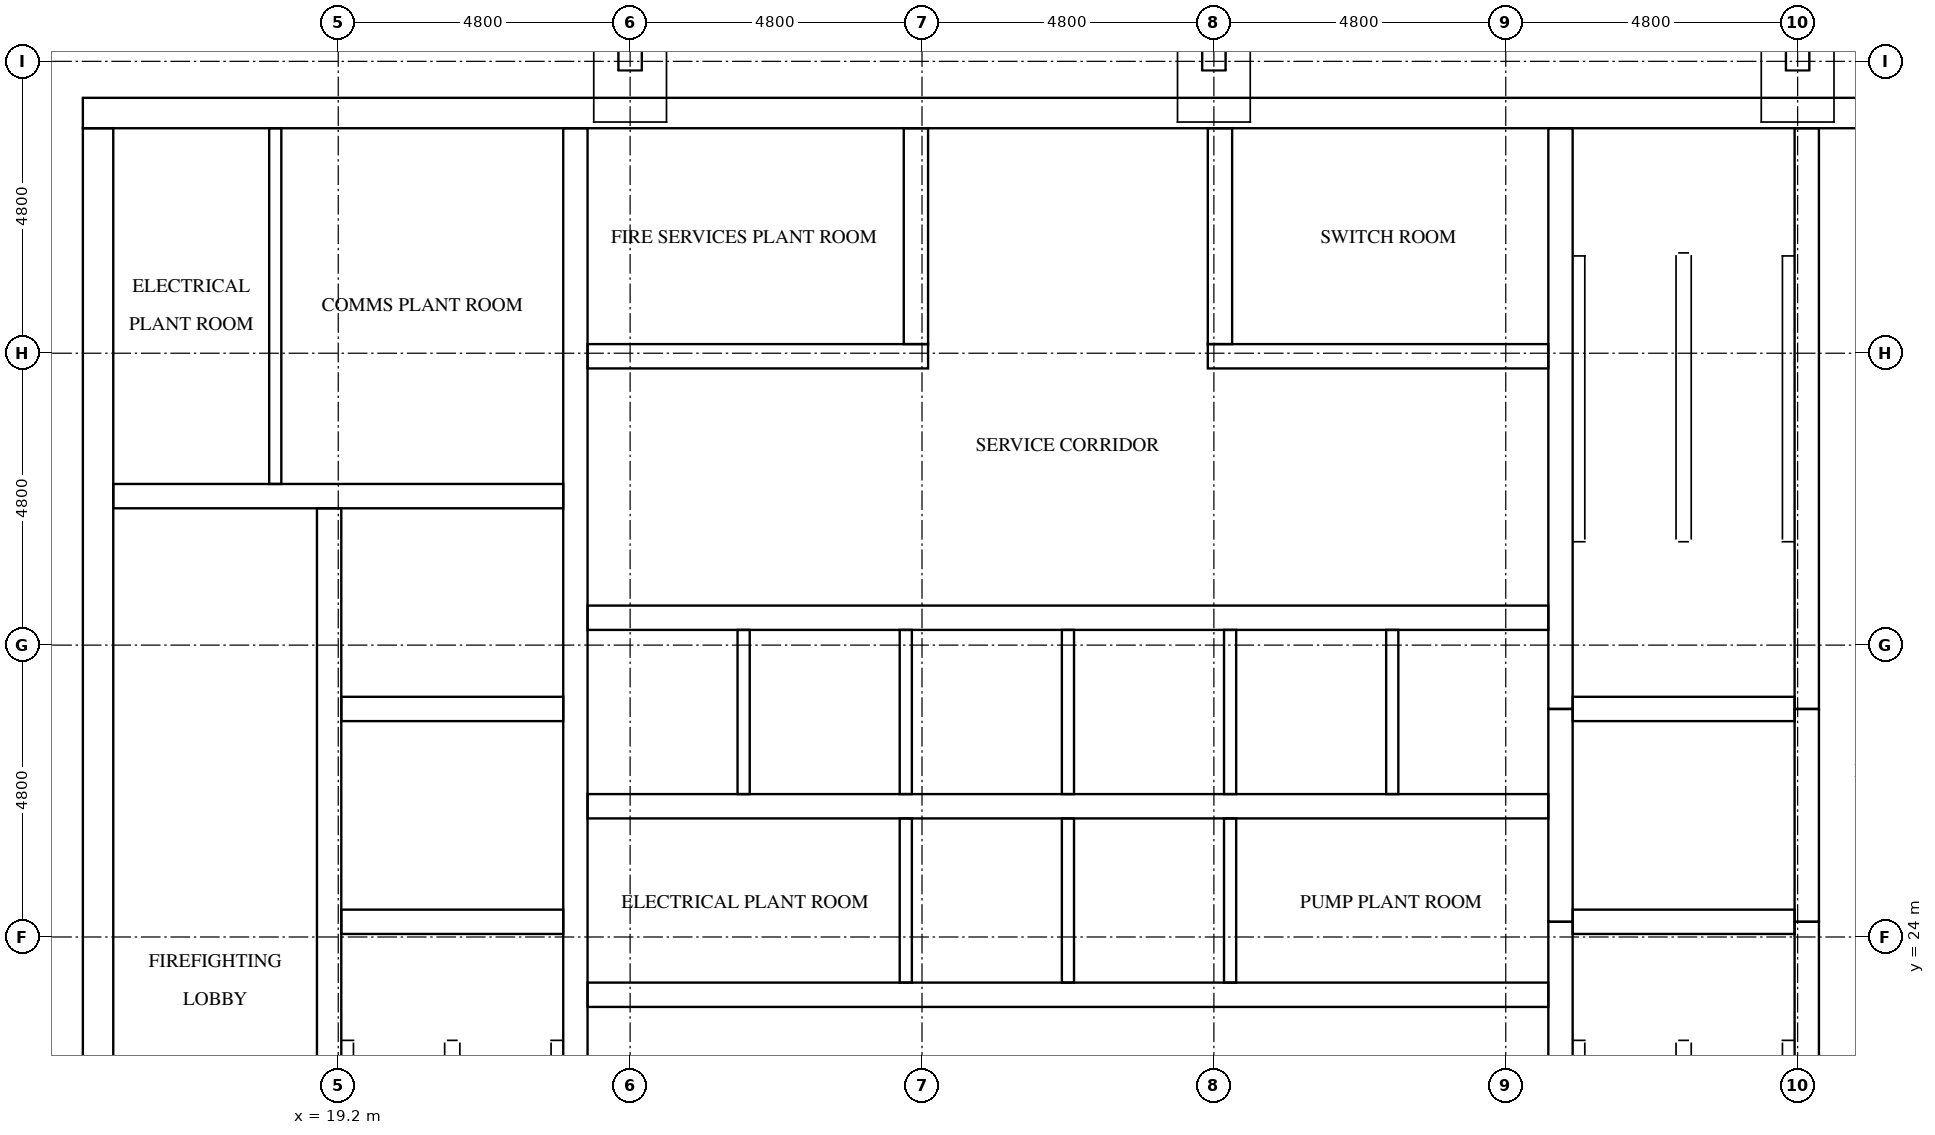
"""IFC4 building model, lengths in metres.
Left out: names, types, materials, properties, quantities, classifications, styles, units other than length and angle.
Written with IfcOpenShell. Run it as: python <this file> out.ifc"""

import sys

from ifc_helpers import new_model, si_unit, direction, frame, frame_2d, origin, place, context, subcontext, project, spatial, rectangle, extrude, element, fill, save


model = new_model("IFC4")
c1 = context("Model", 3, precision=1e-05, world=origin(), true_north=direction((0.0, 1.0)))
c2 = subcontext(c1, "Body", "Model", "MODEL_VIEW")
j1 = project(units=[si_unit("LENGTHUNIT", "METRE"), si_unit("PLANEANGLEUNIT", "RADIAN")], contexts=[c1])
p1 = place(None, origin())
s1 = spatial("IfcSite", under=j1, at=p1, CompositionType="ELEMENT")
p2 = place(p1, origin())
s2 = spatial("IfcBuilding", under=s1, at=p2, CompositionType="ELEMENT")
p3 = place(p2, frame((0.0, 0.0, 263.2)))
s3 = spatial("IfcBuildingStorey", under=s2, at=p3, CompositionType="ELEMENT", Elevation=263.2)
p4 = place(p3, frame((15.0, 37.55, 0.0), z_axis=(0.0, 0.0, 1.0), x_axis=(1.0, 0.0, 0.0)))
e1 = element("IfcWall", 1, at=p4, inside=s3, PredefinedType="SHEAR", context=c2, shape_type="SweptSolid", body=[
    extrude(rectangle(XDim=32.4, YDim=0.5, at=frame_2d((16.2, 0.0))), origin(), (0.0, 0.0, 1.0), 5.1),
])
p5 = place(p4, frame((15.3, 0.0, 0.0)))
e2 = element("IfcOpeningElement", 2, at=p5, cuts=e1, PredefinedType="OPENING", context=c2, shape_type="SweptSolid", body=[
    extrude(rectangle(XDim=1.8, YDim=2.1, at=frame_2d((0.9, 1.05))), frame((0.0, 0.26, 0.0), z_axis=(0.0, -1.0, 0.0), x_axis=(1.0, 0.0, 0.0)), (0.0, 0.0, 1.0), 0.52),
])
p6 = place(p4, frame((1.282, 0.0, 0.0)))
e3 = element("IfcOpeningElement", 3, at=p6, cuts=e1, PredefinedType="OPENING", context=c2, shape_type="SweptSolid", body=[
    extrude(rectangle(XDim=1.0, YDim=2.1, at=frame_2d((0.5, 1.05))), frame((0.0, 0.26, 0.0), z_axis=(0.0, -1.0, 0.0), x_axis=(1.0, 0.0, 0.0)), (0.0, 0.0, 1.0), 0.52),
])
p7 = place(p4, frame((5.082, 0.0, 0.0)))
e4 = element("IfcOpeningElement", 4, at=p7, cuts=e1, PredefinedType="OPENING", context=c2, shape_type="SweptSolid", body=[
    extrude(rectangle(XDim=1.0, YDim=2.1, at=frame_2d((0.5, 1.05))), frame((0.0, 0.26, 0.0), z_axis=(0.0, -1.0, 0.0), x_axis=(1.0, 0.0, 0.0)), (0.0, 0.0, 1.0), 0.52),
])
p8 = place(p3, frame((15.25, 15.5, 0.0), z_axis=(0.0, 0.0, 1.0), x_axis=(0.0, 1.0, 0.0)))
e5 = element("IfcWall", 5, at=p8, inside=s3, PredefinedType="SHEAR", context=c2, shape_type="SweptSolid", body=[
    extrude(rectangle(XDim=21.8, YDim=0.5, at=frame_2d((10.9, 0.0))), origin(), (0.0, 0.0, 1.0), 5.1),
])
p9 = place(p8, frame((5.26, 0.0, 0.0)))
e6 = element("IfcOpeningElement", 6, at=p9, cuts=e5, PredefinedType="OPENING", context=c2, shape_type="SweptSolid", body=[
    extrude(rectangle(XDim=1.2, YDim=2.1, at=frame_2d((0.6, 1.05))), frame((0.0, 0.26, 0.0), z_axis=(0.0, -1.0, 0.0), x_axis=(1.0, 0.0, 0.0)), (0.0, 0.0, 1.0), 0.52),
])
p10 = place(p3, frame((19.05, 15.5, 0.0), z_axis=(0.0, 0.0, 1.0), x_axis=(0.0, 1.0, 0.0)))
e7 = element("IfcWall", 7, at=p10, inside=s3, PredefinedType="SHEAR", context=c2, shape_type="SweptSolid", body=[
    extrude(rectangle(XDim=15.55, YDim=0.4, at=frame_2d((7.775, 0.0))), origin(), (0.0, 0.0, 1.0), 5.1),
])
p11 = place(p10, frame((9.95, 0.0, 0.0)))
e8 = element("IfcOpeningElement", 8, at=p11, cuts=e7, PredefinedType="OPENING", context=c2, shape_type="SweptSolid", body=[
    extrude(rectangle(XDim=1.1, YDim=2.1, at=frame_2d((0.55, 1.05))), frame((0.0, 0.21, 0.0), z_axis=(0.0, -1.0, 0.0), x_axis=(1.0, 0.0, 0.0)), (0.0, 0.0, 1.0), 0.42),
])
p12 = place(p10, frame((13.45, 0.0, 0.0)))
e9 = element("IfcOpeningElement", 9, at=p12, cuts=e7, PredefinedType="OPENING", context=c2, shape_type="SweptSolid", body=[
    extrude(rectangle(XDim=1.1, YDim=2.1, at=frame_2d((0.55, 1.05))), frame((0.0, 0.21, 0.0), z_axis=(0.0, -1.0, 0.0), x_axis=(1.0, 0.0, 0.0)), (0.0, 0.0, 1.0), 0.42),
])
p13 = place(p10, frame((0.7, 0.0, 0.0)))
e10 = element("IfcOpeningElement", 10, at=p13, cuts=e7, PredefinedType="OPENING", context=c2, shape_type="SweptSolid", body=[
    extrude(rectangle(XDim=1.2, YDim=2.1, at=frame_2d((0.6, 1.05))), frame((0.0, 0.21, 0.0), z_axis=(0.0, -1.0, 0.0), x_axis=(1.0, 0.0, 0.0)), (0.0, 0.0, 1.0), 0.42),
])
p14 = place(p3, frame((23.1, 15.5, 0.0), z_axis=(0.0, 0.0, 1.0), x_axis=(0.0, 1.0, 0.0)))
e11 = element("IfcWall", 11, at=p14, inside=s3, PredefinedType="SHEAR", context=c2, shape_type="SweptSolid", body=[
    extrude(rectangle(XDim=21.8, YDim=0.4, at=frame_2d((10.9, 0.0))), origin(), (0.0, 0.0, 1.0), 5.1),
])
p15 = place(p3, frame((39.3, 15.5, 0.0), z_axis=(0.0, 0.0, 1.0), x_axis=(0.0, 1.0, 0.0)))
e12 = element("IfcWall", 12, at=p15, inside=s3, PredefinedType="SHEAR", context=c2, shape_type="SweptSolid", body=[
    extrude(rectangle(XDim=8.75, YDim=0.4, at=frame_2d((4.375, 0.0))), origin(), (0.0, 0.0, 1.0), 5.1),
])
p16 = place(p3, frame((39.3, 24.25, 0.0), z_axis=(0.0, 0.0, 1.0), x_axis=(0.0, 1.0, 0.0)))
e13 = element("IfcWall", 13, at=p16, inside=s3, PredefinedType="SHEAR", context=c2, shape_type="SweptSolid", body=[
    extrude(rectangle(XDim=3.5, YDim=0.4, at=frame_2d((1.75, 0.0))), origin(), (0.0, 0.0, 1.0), 5.1),
])
p17 = place(p3, frame((39.3, 27.75, 0.0), z_axis=(0.0, 0.0, 1.0), x_axis=(0.0, 1.0, 0.0)))
e14 = element("IfcWall", 14, at=p17, inside=s3, PredefinedType="SHEAR", context=c2, shape_type="SweptSolid", body=[
    extrude(rectangle(XDim=9.55, YDim=0.4, at=frame_2d((4.775, 0.0))), origin(), (0.0, 0.0, 1.0), 5.1),
])
p18 = place(p3, frame((43.35, 15.5, 0.0), z_axis=(0.0, 0.0, 1.0), x_axis=(0.0, 1.0, 0.0)))
e15 = element("IfcWall", 15, at=p18, inside=s3, PredefinedType="SHEAR", context=c2, shape_type="SweptSolid", body=[
    extrude(rectangle(XDim=8.75, YDim=0.4, at=frame_2d((4.375, 0.0))), origin(), (0.0, 0.0, 1.0), 5.1),
])
p19 = place(p18, frame((0.7, 0.0, 0.0)))
e16 = element("IfcOpeningElement", 16, at=p19, cuts=e15, PredefinedType="OPENING", context=c2, shape_type="SweptSolid", body=[
    extrude(rectangle(XDim=1.2, YDim=2.1, at=frame_2d((0.6, 1.05))), frame((0.0, 0.21, 0.0), z_axis=(0.0, -1.0, 0.0), x_axis=(1.0, 0.0, 0.0)), (0.0, 0.0, 1.0), 0.42),
])
p20 = place(p3, frame((43.35, 24.25, 0.0), z_axis=(0.0, 0.0, 1.0), x_axis=(0.0, 1.0, 0.0)))
e17 = element("IfcWall", 17, at=p20, inside=s3, PredefinedType="SHEAR", context=c2, shape_type="SweptSolid", body=[
    extrude(rectangle(XDim=3.5, YDim=0.4, at=frame_2d((1.75, 0.0))), origin(), (0.0, 0.0, 1.0), 5.1),
])
p21 = place(p20, frame((1.2, 0.0, 0.0)))
e18 = element("IfcOpeningElement", 18, at=p21, cuts=e17, PredefinedType="OPENING", context=c2, shape_type="SweptSolid", body=[
    extrude(rectangle(XDim=1.1, YDim=2.1, at=frame_2d((0.55, 1.05))), frame((0.0, 0.21, 0.0), z_axis=(0.0, -1.0, 0.0), x_axis=(1.0, 0.0, 0.0)), (0.0, 0.0, 1.0), 0.42),
])
p22 = place(p3, frame((43.35, 27.75, 0.0), z_axis=(0.0, 0.0, 1.0), x_axis=(0.0, 1.0, 0.0)))
e19 = element("IfcWall", 19, at=p22, inside=s3, PredefinedType="SHEAR", context=c2, shape_type="SweptSolid", body=[
    extrude(rectangle(XDim=9.55, YDim=0.4, at=frame_2d((4.775, 0.0))), origin(), (0.0, 0.0, 1.0), 5.1),
])
p23 = place(p22, frame((7.65, 0.0, 0.0)))
e20 = element("IfcOpeningElement", 20, at=p23, cuts=e19, PredefinedType="OPENING", context=c2, shape_type="SweptSolid", body=[
    extrude(rectangle(XDim=1.2, YDim=2.1, at=frame_2d((0.6, 1.05))), frame((0.0, 0.21, 0.0), z_axis=(0.0, -1.0, 0.0), x_axis=(1.0, 0.0, 0.0)), (0.0, 0.0, 1.0), 0.42),
])
for number, where, z_axis, x_axis in (
    (21, (19.25, 24.25, 0.0), (0.0, 0.0, 1.0), (1.0, 0.0, 0.0)),
    (22, (19.25, 27.75, 0.0), (0.0, 0.0, 1.0), (1.0, 0.0, 0.0)),
):
    element("IfcWall", number, at=place(p3, frame(where, z_axis=z_axis, x_axis=x_axis)), inside=s3, PredefinedType="SHEAR", context=c2, shape_type="SweptSolid", body=[
        extrude(rectangle(XDim=3.65, YDim=0.4, at=frame_2d((1.825, 0.0))), origin(), (0.0, 0.0, 1.0), 5.1),
    ])
p24 = place(p3, frame((15.5, 31.25, 0.0), z_axis=(0.0, 0.0, 1.0), x_axis=(1.0, 0.0, 0.0)))
e23 = element("IfcWall", 23, at=p24, inside=s3, PredefinedType="SHEAR", context=c2, shape_type="SweptSolid", body=[
    extrude(rectangle(XDim=7.4, YDim=0.4, at=frame_2d((3.7, 0.0))), origin(), (0.0, 0.0, 1.0), 5.1),
])
for number, where, z_axis, x_axis in (
    (24, (39.5, 24.25, 0.0), (0.0, 0.0, 1.0), (1.0, 0.0, 0.0)),
    (25, (39.5, 27.75, 0.0), (0.0, 0.0, 1.0), (1.0, 0.0, 0.0)),
):
    element("IfcWall", number, at=place(p3, frame(where, z_axis=z_axis, x_axis=x_axis)), inside=s3, PredefinedType="SHEAR", context=c2, shape_type="SweptSolid", body=[
        extrude(rectangle(XDim=3.65, YDim=0.4, at=frame_2d((1.825, 0.0))), origin(), (0.0, 0.0, 1.0), 5.1),
    ])
p25 = place(p3, frame((23.3, 23.05, 0.0), z_axis=(0.0, 0.0, 1.0), x_axis=(1.0, 0.0, 0.0)))
e26 = element("IfcWall", 26, at=p25, inside=s3, PredefinedType="SHEAR", context=c2, shape_type="SweptSolid", body=[
    extrude(rectangle(XDim=15.8, YDim=0.4, at=frame_2d((7.9, 0.0))), origin(), (0.0, 0.0, 1.0), 5.1),
])
p26 = place(p25, frame((2.067, 0.0, 0.0)))
e27 = element("IfcOpeningElement", 27, at=p26, cuts=e26, PredefinedType="OPENING", context=c2, shape_type="SweptSolid", body=[
    extrude(rectangle(XDim=1.0, YDim=2.1, at=frame_2d((0.5, 1.05))), frame((0.0, 0.21, 0.0), z_axis=(0.0, -1.0, 0.0), x_axis=(1.0, 0.0, 0.0)), (0.0, 0.0, 1.0), 0.42),
])
p27 = place(p25, frame((12.733, 0.0, 0.0)))
e28 = element("IfcOpeningElement", 28, at=p27, cuts=e26, PredefinedType="OPENING", context=c2, shape_type="SweptSolid", body=[
    extrude(rectangle(XDim=1.0, YDim=2.1, at=frame_2d((0.5, 1.05))), frame((0.0, 0.21, 0.0), z_axis=(0.0, -1.0, 0.0), x_axis=(1.0, 0.0, 0.0)), (0.0, 0.0, 1.0), 0.42),
])
for number, where, z_axis, x_axis in (
    (29, (23.3, 26.15, 0.0), (0.0, 0.0, 1.0), (1.0, 0.0, 0.0)),
    (30, (23.3, 29.25, 0.0), (0.0, 0.0, 1.0), (1.0, 0.0, 0.0)),
):
    element("IfcWall", number, at=place(p3, frame(where, z_axis=z_axis, x_axis=x_axis)), inside=s3, PredefinedType="SHEAR", context=c2, shape_type="SweptSolid", body=[
        extrude(rectangle(XDim=15.8, YDim=0.4, at=frame_2d((7.9, 0.0))), origin(), (0.0, 0.0, 1.0), 5.1),
    ])
p28 = place(p3, frame((23.3, 33.55, 0.0), z_axis=(0.0, 0.0, 1.0), x_axis=(1.0, 0.0, 0.0)))
e31 = element("IfcWall", 31, at=p28, inside=s3, PredefinedType="SHEAR", context=c2, shape_type="SweptSolid", body=[
    extrude(rectangle(XDim=5.6, YDim=0.4, at=frame_2d((2.8, 0.0))), origin(), (0.0, 0.0, 1.0), 5.1),
])
p29 = place(p28, frame((2.1, 0.0, 0.0)))
e32 = element("IfcOpeningElement", 32, at=p29, cuts=e31, PredefinedType="OPENING", context=c2, shape_type="SweptSolid", body=[
    extrude(rectangle(XDim=1.0, YDim=2.1, at=frame_2d((0.5, 1.05))), frame((0.0, 0.21, 0.0), z_axis=(0.0, -1.0, 0.0), x_axis=(1.0, 0.0, 0.0)), (0.0, 0.0, 1.0), 0.42),
])
p30 = place(p3, frame((33.5, 33.55, 0.0), z_axis=(0.0, 0.0, 1.0), x_axis=(1.0, 0.0, 0.0)))
e33 = element("IfcWall", 33, at=p30, inside=s3, PredefinedType="SHEAR", context=c2, shape_type="SweptSolid", body=[
    extrude(rectangle(XDim=5.6, YDim=0.4, at=frame_2d((2.8, 0.0))), origin(), (0.0, 0.0, 1.0), 5.1),
])
p31 = place(p30, frame((2.5, 0.0, 0.0)))
e34 = element("IfcOpeningElement", 34, at=p31, cuts=e33, PredefinedType="OPENING", context=c2, shape_type="SweptSolid", body=[
    extrude(rectangle(XDim=1.0, YDim=2.1, at=frame_2d((0.5, 1.05))), frame((0.0, 0.21, 0.0), z_axis=(0.0, -1.0, 0.0), x_axis=(1.0, 0.0, 0.0)), (0.0, 0.0, 1.0), 0.42),
])
for number, where, z_axis, x_axis in (
    (35, (28.7, 33.75, 0.0), (0.0, 0.0, 1.0), (0.0, 1.0, 0.0)),
    (36, (33.7, 33.75, 0.0), (0.0, 0.0, 1.0), (0.0, 1.0, 0.0)),
):
    element("IfcWall", number, at=place(p3, frame(where, z_axis=z_axis, x_axis=x_axis)), inside=s3, PredefinedType="SHEAR", context=c2, shape_type="SweptSolid", body=[
        extrude(rectangle(XDim=3.55, YDim=0.4, at=frame_2d((1.775, 0.0))), origin(), (0.0, 0.0, 1.0), 5.1),
    ])
for number, where, z_axis, x_axis in (
    (37, (25.867, 26.35, 0.0), (0.0, 0.0, 1.0), (0.0, 1.0, 0.0)),
    (38, (28.533, 23.25, 0.0), (0.0, 0.0, 1.0), (0.0, 1.0, 0.0)),
    (39, (28.533, 26.35, 0.0), (0.0, 0.0, 1.0), (0.0, 1.0, 0.0)),
    (40, (31.2, 23.25, 0.0), (0.0, 0.0, 1.0), (0.0, 1.0, 0.0)),
    (41, (31.2, 26.35, 0.0), (0.0, 0.0, 1.0), (0.0, 1.0, 0.0)),
    (42, (33.867, 23.25, 0.0), (0.0, 0.0, 1.0), (0.0, 1.0, 0.0)),
    (43, (33.867, 26.35, 0.0), (0.0, 0.0, 1.0), (0.0, 1.0, 0.0)),
    (44, (36.533, 26.35, 0.0), (0.0, 0.0, 1.0), (0.0, 1.0, 0.0)),
):
    element("IfcWall", number, at=place(p3, frame(where, z_axis=z_axis, x_axis=x_axis)), inside=s3, PredefinedType="SOLIDWALL", context=c2, shape_type="SweptSolid", body=[
        extrude(rectangle(XDim=2.7, YDim=0.2, at=frame_2d((1.35, 0.0))), origin(), (0.0, 0.0, 1.0), 5.1),
    ])
p32 = place(p3, frame((18.164, 31.45, 0.0), z_axis=(0.0, 0.0, 1.0), x_axis=(0.0, 1.0, 0.0)))
e45 = element("IfcWall", 45, at=p32, inside=s3, PredefinedType="PARTITIONING", context=c2, shape_type="SweptSolid", body=[
    extrude(rectangle(XDim=5.85, YDim=0.2, at=frame_2d((2.925, 0.0))), origin(), (0.0, 0.0, 1.0), 5.1),
])
p33 = place(p11, origin())
e46 = element("IfcDoor", 46, at=p33, inside=s3, OperationType="DOUBLE_DOOR_SLIDING", PredefinedType="DOOR", context=c2, shape_type="SweptSolid", body=[
    extrude(rectangle(XDim=1.1, YDim=2.1, at=frame_2d((0.55, 1.05))), frame((0.0, 0.025, 0.0), z_axis=(0.0, -1.0, 0.0), x_axis=(1.0, 0.0, 0.0)), (0.0, 0.0, 1.0), 0.05),
])
fill(e8, e46)
p34 = place(p12, origin())
e47 = element("IfcDoor", 47, at=p34, inside=s3, OperationType="DOUBLE_DOOR_SLIDING", PredefinedType="DOOR", context=c2, shape_type="SweptSolid", body=[
    extrude(rectangle(XDim=1.1, YDim=2.1, at=frame_2d((0.55, 1.05))), frame((0.0, 0.025, 0.0), z_axis=(0.0, -1.0, 0.0), x_axis=(1.0, 0.0, 0.0)), (0.0, 0.0, 1.0), 0.05),
])
fill(e9, e47)
p35 = place(p21, origin())
e48 = element("IfcDoor", 48, at=p35, inside=s3, OperationType="DOUBLE_DOOR_SLIDING", PredefinedType="DOOR", context=c2, shape_type="SweptSolid", body=[
    extrude(rectangle(XDim=1.1, YDim=2.1, at=frame_2d((0.55, 1.05))), frame((0.0, 0.025, 0.0), z_axis=(0.0, -1.0, 0.0), x_axis=(1.0, 0.0, 0.0)), (0.0, 0.0, 1.0), 0.05),
])
fill(e18, e48)
p36 = place(p23, origin())
e49 = element("IfcDoor", 49, at=p36, inside=s3, OperationType="SINGLE_SWING_LEFT", PredefinedType="DOOR", context=c2, shape_type="SweptSolid", body=[
    extrude(rectangle(XDim=1.2, YDim=2.1, at=frame_2d((0.6, 1.05))), frame((0.0, 0.025, 0.0), z_axis=(0.0, -1.0, 0.0), x_axis=(1.0, 0.0, 0.0)), (0.0, 0.0, 1.0), 0.05),
])
fill(e20, e49)
p37 = place(p5, origin())
e50 = element("IfcDoor", 50, at=p37, inside=s3, OperationType="DOUBLE_DOOR_SINGLE_SWING", PredefinedType="DOOR", context=c2, shape_type="SweptSolid", body=[
    extrude(rectangle(XDim=1.8, YDim=2.1, at=frame_2d((0.9, 1.05))), frame((0.0, 0.025, 0.0), z_axis=(0.0, -1.0, 0.0), x_axis=(1.0, 0.0, 0.0)), (0.0, 0.0, 1.0), 0.05),
])
fill(e2, e50)
p38 = place(p6, origin())
e51 = element("IfcDoor", 51, at=p38, inside=s3, OperationType="SINGLE_SWING_RIGHT", PredefinedType="DOOR", context=c2, shape_type="SweptSolid", body=[
    extrude(rectangle(XDim=1.0, YDim=2.1, at=frame_2d((0.5, 1.05))), frame((0.0, 0.025, 0.0), z_axis=(0.0, -1.0, 0.0), x_axis=(1.0, 0.0, 0.0)), (0.0, 0.0, 1.0), 0.05),
])
fill(e3, e51)
p39 = place(p7, origin())
e52 = element("IfcDoor", 52, at=p39, inside=s3, OperationType="SINGLE_SWING_LEFT", PredefinedType="DOOR", context=c2, shape_type="SweptSolid", body=[
    extrude(rectangle(XDim=1.0, YDim=2.1, at=frame_2d((0.5, 1.05))), frame((0.0, 0.025, 0.0), z_axis=(0.0, -1.0, 0.0), x_axis=(1.0, 0.0, 0.0)), (0.0, 0.0, 1.0), 0.05),
])
fill(e4, e52)
p40 = place(p26, frame((1.0, 0.0, 0.0), z_axis=(0.0, 0.0, 1.0), x_axis=(-1.0, 0.0, 0.0)))
e53 = element("IfcDoor", 53, at=p40, inside=s3, OperationType="SINGLE_SWING_RIGHT", PredefinedType="DOOR", context=c2, shape_type="SweptSolid", body=[
    extrude(rectangle(XDim=1.0, YDim=2.1, at=frame_2d((0.5, 1.05))), frame((0.0, 0.025, 0.0), z_axis=(0.0, -1.0, 0.0), x_axis=(1.0, 0.0, 0.0)), (0.0, 0.0, 1.0), 0.05),
])
fill(e27, e53)
p41 = place(p27, frame((1.0, 0.0, 0.0), z_axis=(0.0, 0.0, 1.0), x_axis=(-1.0, 0.0, 0.0)))
e54 = element("IfcDoor", 54, at=p41, inside=s3, OperationType="SINGLE_SWING_LEFT", PredefinedType="DOOR", context=c2, shape_type="SweptSolid", body=[
    extrude(rectangle(XDim=1.0, YDim=2.1, at=frame_2d((0.5, 1.05))), frame((0.0, 0.025, 0.0), z_axis=(0.0, -1.0, 0.0), x_axis=(1.0, 0.0, 0.0)), (0.0, 0.0, 1.0), 0.05),
])
fill(e28, e54)
p42 = place(p29, frame((1.0, 0.0, 0.0), z_axis=(0.0, 0.0, 1.0), x_axis=(-1.0, 0.0, 0.0)))
e55 = element("IfcDoor", 55, at=p42, inside=s3, OperationType="SINGLE_SWING_RIGHT", PredefinedType="DOOR", context=c2, shape_type="SweptSolid", body=[
    extrude(rectangle(XDim=1.0, YDim=2.1, at=frame_2d((0.5, 1.05))), frame((0.0, 0.025, 0.0), z_axis=(0.0, -1.0, 0.0), x_axis=(1.0, 0.0, 0.0)), (0.0, 0.0, 1.0), 0.05),
])
fill(e32, e55)
p43 = place(p31, frame((1.0, 0.0, 0.0), z_axis=(0.0, 0.0, 1.0), x_axis=(-1.0, 0.0, 0.0)))
e56 = element("IfcDoor", 56, at=p43, inside=s3, OperationType="SINGLE_SWING_LEFT", PredefinedType="DOOR", context=c2, shape_type="SweptSolid", body=[
    extrude(rectangle(XDim=1.0, YDim=2.1, at=frame_2d((0.5, 1.05))), frame((0.0, 0.025, 0.0), z_axis=(0.0, -1.0, 0.0), x_axis=(1.0, 0.0, 0.0)), (0.0, 0.0, 1.0), 0.05),
])
fill(e34, e56)
save(model, sys.argv[1])
